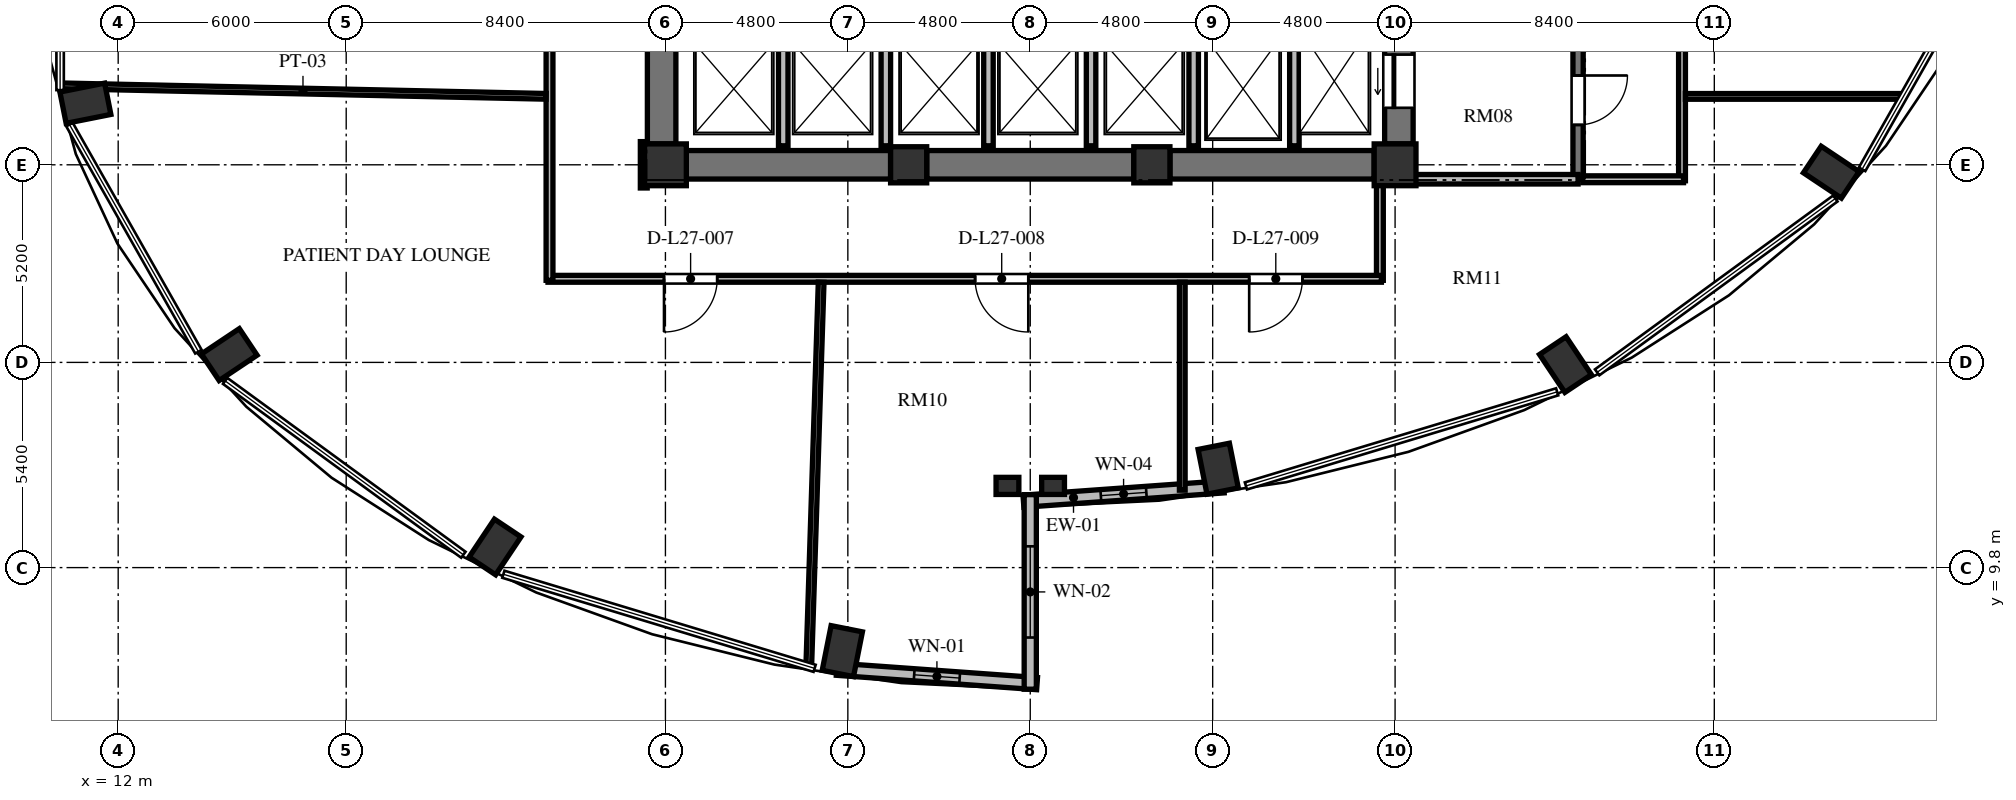
"""IFC4 building model, lengths in metres.
Left out: names, types, materials, properties, quantities, classifications, styles, units other than length and angle.
Written with IfcOpenShell. Run it as: python <this file> out.ifc"""

import sys

from ifc_helpers import new_model, si_unit, direction, frame, frame_2d, origin, origin_2d, place, context, subcontext, project, spatial, rectangle, extrude, element, fill, save


model = new_model("IFC4")
c1 = context("Model", 3, precision=1e-05, world=origin(), true_north=direction((0.0, 1.0)))
c2 = subcontext(c1, "Body", "Model", "MODEL_VIEW")
j1 = project(units=[si_unit("LENGTHUNIT", "METRE"), si_unit("PLANEANGLEUNIT", "RADIAN")], contexts=[c1])
p1 = place(None, origin())
s1 = spatial("IfcSite", under=j1, at=p1, CompositionType="ELEMENT")
p2 = place(p1, origin())
s2 = spatial("IfcBuilding", under=s1, at=p2, CompositionType="ELEMENT")
p3 = place(p2, frame((0.0, 0.0, 107.28)))
s3 = spatial("IfcBuildingStorey", under=s2, at=p3, CompositionType="ELEMENT", Elevation=107.28)
for number, where, z_axis, x_axis in (
    (1, (40.946, 12.403, 0.0), (0.0, 0.0, 1.0), (0.195, -0.981, 0.0)),
    (2, (50.084, 15.143, 0.0), (0.0, 0.0, 1.0), (0.556, -0.831, 0.0)),
    (3, (57.078, 20.205, 0.0), (0.0, 0.0, 1.0), (0.831, -0.556, 0.0)),
    (4, (11.137, 22.02, 0.0), (0.0, 0.0, 1.0), (-0.981, -0.195, 0.0)),
    (5, (14.922, 15.405, 0.0), (0.0, 0.0, 1.0), (-0.831, -0.556, 0.0)),
    (6, (21.916, 10.343, 0.0), (0.0, 0.0, 1.0), (-0.556, -0.831, 0.0)),
    (7, (31.054, 7.603, 0.0), (0.0, 0.0, 1.0), (-0.195, -0.981, 0.0)),
):
    element("IfcColumn", number, at=place(p3, frame(where, z_axis=z_axis, x_axis=x_axis)), inside=s3, PredefinedType="COLUMN", context=c2, shape_type="SweptSolid", body=[
        extrude(rectangle(XDim=1.2, YDim=0.84, at=origin_2d()), origin(), (0.0, 0.0, 1.0), 3.648),
    ])
p4 = place(p3, frame((26.4, 20.4, 0.0), z_axis=(0.0, 0.0, 1.0), x_axis=(1.0, 0.0, 0.0)))
e8 = element("IfcColumn", 8, at=p4, inside=s3, PredefinedType="COLUMN", context=c2, shape_type="SweptSolid", body=[
    extrude(rectangle(XDim=1.1, YDim=1.1, at=origin_2d()), origin(), (0.0, 0.0, 1.0), 3.648),
])
for number, where, z_axis, x_axis in (
    (9, (32.8, 20.4, 0.0), (0.0, 0.0, 1.0), (1.0, 0.0, 0.0)),
    (10, (39.2, 20.4, 0.0), (0.0, 0.0, 1.0), (1.0, 0.0, 0.0)),
):
    element("IfcColumn", number, at=place(p3, frame(where, z_axis=z_axis, x_axis=x_axis)), inside=s3, PredefinedType="COLUMN", context=c2, shape_type="SweptSolid", body=[
        extrude(rectangle(XDim=0.95, YDim=0.95, at=origin_2d()), origin(), (0.0, 0.0, 1.0), 3.648),
    ])
p5 = place(p3, frame((45.6, 20.4, 0.0), z_axis=(0.0, 0.0, 1.0), x_axis=(1.0, 0.0, 0.0)))
e11 = element("IfcColumn", 11, at=p5, inside=s3, PredefinedType="COLUMN", context=c2, shape_type="SweptSolid", body=[
    extrude(rectangle(XDim=1.1, YDim=1.1, at=origin_2d()), origin(), (0.0, 0.0, 1.0), 3.648),
])
for number, where, z_axis, x_axis in (
    (12, (35.4, 11.95, 0.0), (0.0, 0.0, 1.0), (1.0, 0.0, 0.0)),
    (13, (36.6, 11.95, 0.0), (0.0, 0.0, 1.0), (1.0, 0.0, 0.0)),
):
    element("IfcColumn", number, at=place(p3, frame(where, z_axis=z_axis, x_axis=x_axis)), inside=s3, PredefinedType="PILASTER", context=c2, shape_type="SweptSolid", body=[
        extrude(rectangle(XDim=0.6, YDim=0.45, at=origin_2d()), origin(), (0.0, 0.0, 1.0), 3.648),
    ])
p6 = place(p3, frame((26.3, 20.95, 0.0), z_axis=(0.0, 0.0, 1.0), x_axis=(0.0, 1.0, 0.0)))
e14 = element("IfcWall", 14, at=p6, inside=s3, PredefinedType="SHEAR", context=c2, shape_type="SweptSolid", body=[
    extrude(rectangle(XDim=14.1, YDim=0.75, at=frame_2d((7.05, 0.0))), origin(), (0.0, 0.0, 1.0), 3.648),
])
p7 = place(p6, frame((6.5, 0.0, 0.0)))
e15 = element("IfcOpeningElement", 15, at=p7, cuts=e14, PredefinedType="OPENING", context=c2, shape_type="SweptSolid", body=[
    extrude(rectangle(XDim=1.2, YDim=2.15, at=frame_2d((0.6, 1.075))), frame((0.0, 0.385, 0.0), z_axis=(0.0, -1.0, 0.0), x_axis=(1.0, 0.0, 0.0)), (0.0, 0.0, 1.0), 0.77),
])
p8 = place(p6, frame((9.6, 0.0, 0.0)))
e16 = element("IfcOpeningElement", 16, at=p8, cuts=e14, PredefinedType="OPENING", context=c2, shape_type="SweptSolid", body=[
    extrude(rectangle(XDim=1.3, YDim=2.2, at=frame_2d((0.65, 1.1))), frame((0.0, 0.385, 0.0), z_axis=(0.0, -1.0, 0.0), x_axis=(1.0, 0.0, 0.0)), (0.0, 0.0, 1.0), 0.77),
])
p9 = place(p6, frame((3.26, 0.0, 0.0)))
e17 = element("IfcOpeningElement", 17, at=p9, cuts=e14, PredefinedType="OPENING", context=c2, shape_type="SweptSolid", body=[
    extrude(rectangle(XDim=1.3, YDim=2.2, at=frame_2d((0.65, 1.1))), frame((0.0, 0.385, 0.0), z_axis=(0.0, -1.0, 0.0), x_axis=(1.0, 0.0, 0.0)), (0.0, 0.0, 1.0), 0.77),
])
p10 = place(p3, frame((45.7, 20.95, 0.0), z_axis=(0.0, 0.0, 1.0), x_axis=(0.0, 1.0, 0.0)))
e18 = element("IfcWall", 18, at=p10, inside=s3, PredefinedType="SHEAR", context=c2, shape_type="SweptSolid", body=[
    extrude(rectangle(XDim=14.1, YDim=0.75, at=frame_2d((7.05, 0.0))), origin(), (0.0, 0.0, 1.0), 3.648),
])
p11 = place(p10, frame((11.75, 0.0, 0.0)))
e19 = element("IfcOpeningElement", 19, at=p11, cuts=e18, PredefinedType="OPENING", context=c2, shape_type="SweptSolid", body=[
    extrude(rectangle(XDim=1.4, YDim=2.3, at=frame_2d((0.7, 1.15))), frame((0.0, 0.385, 0.0), z_axis=(0.0, -1.0, 0.0), x_axis=(1.0, 0.0, 0.0)), (0.0, 0.0, 1.0), 0.77),
])
p12 = place(p10, frame((0.95, 0.0, 0.0)))
e20 = element("IfcOpeningElement", 20, at=p12, cuts=e18, PredefinedType="OPENING", context=c2, shape_type="SweptSolid", body=[
    extrude(rectangle(XDim=1.4, YDim=2.3, at=frame_2d((0.7, 1.15))), frame((0.0, 0.385, 0.0), z_axis=(0.0, -1.0, 0.0), x_axis=(1.0, 0.0, 0.0)), (0.0, 0.0, 1.0), 0.77),
])
p13 = place(p3, frame((26.95, 20.4, 0.0), z_axis=(0.0, 0.0, 1.0), x_axis=(1.0, 0.0, 0.0)))
e21 = element("IfcWall", 21, at=p13, inside=s3, PredefinedType="SHEAR", context=c2, shape_type="SweptSolid", body=[
    extrude(rectangle(XDim=5.375, YDim=0.75, at=frame_2d((2.688, 0.0))), origin(), (0.0, 0.0, 1.0), 3.648),
])
p14 = place(p3, frame((33.275, 20.4, 0.0), z_axis=(0.0, 0.0, 1.0), x_axis=(1.0, 0.0, 0.0)))
e22 = element("IfcWall", 22, at=p14, inside=s3, PredefinedType="SHEAR", context=c2, shape_type="SweptSolid", body=[
    extrude(rectangle(XDim=5.45, YDim=0.75, at=frame_2d((2.725, 0.0))), origin(), (0.0, 0.0, 1.0), 3.648),
])
p15 = place(p3, frame((39.675, 20.4, 0.0), z_axis=(0.0, 0.0, 1.0), x_axis=(1.0, 0.0, 0.0)))
e23 = element("IfcWall", 23, at=p15, inside=s3, PredefinedType="SHEAR", context=c2, shape_type="SweptSolid", body=[
    extrude(rectangle(XDim=5.375, YDim=0.75, at=frame_2d((2.688, 0.0))), origin(), (0.0, 0.0, 1.0), 3.648),
])
p16 = place(p3, frame((35.821, 11.547, 0.0), z_axis=(0.0, 0.0, 1.0), x_axis=(0.997432364291, 0.071614793619, 0.0)))
e24 = element("IfcWall", 24, at=p16, inside=s3, PredefinedType="SOLIDWALL", context=c2, shape_type="SweptSolid", body=[
    extrude(rectangle(XDim=5.284, YDim=0.32, at=frame_2d((2.642, 0.0))), origin(), (0.0, 0.0, 1.0), 3.428),
])
p17 = place(p16, frame((2.042, 0.0, 0.85)))
e25 = element("IfcOpeningElement", 25, at=p17, cuts=e24, PredefinedType="OPENING", context=c2, shape_type="SweptSolid", body=[
    extrude(rectangle(XDim=1.2, YDim=1.8, at=frame_2d((0.6, 0.9))), frame((0.0, 0.17, 0.0), z_axis=(0.0, -1.0, 0.0), x_axis=(1.0, 0.0, 0.0)), (0.0, 0.0, 1.0), 0.34),
])
p18 = place(p3, frame((30.909, 7.125, 0.0), z_axis=(0.0, 0.0, 1.0), x_axis=(0.997431890304, -0.071621394884, 0.0)))
e26 = element("IfcWall", 26, at=p18, inside=s3, PredefinedType="SOLIDWALL", context=c2, shape_type="SweptSolid", body=[
    extrude(rectangle(XDim=5.284, YDim=0.32, at=frame_2d((2.642, 0.0))), origin(), (0.0, 0.0, 1.0), 3.428),
])
p19 = place(p18, frame((2.042, 0.0, 0.85)))
e27 = element("IfcOpeningElement", 27, at=p19, cuts=e26, PredefinedType="OPENING", context=c2, shape_type="SweptSolid", body=[
    extrude(rectangle(XDim=1.2, YDim=2.2, at=frame_2d((0.6, 1.1))), frame((0.0, 0.17, 0.0), z_axis=(0.0, -1.0, 0.0), x_axis=(1.0, 0.0, 0.0)), (0.0, 0.0, 1.0), 0.34),
])
p20 = place(p3, frame((36.0, 6.6, 0.0), z_axis=(0.0, 0.0, 1.0), x_axis=(0.0, 1.0, 0.0)))
e28 = element("IfcWall", 28, at=p20, inside=s3, PredefinedType="SOLIDWALL", context=c2, shape_type="SweptSolid", body=[
    extrude(rectangle(XDim=5.12, YDim=0.32, at=frame_2d((2.56, 0.0))), origin(), (0.0, 0.0, 1.0), 3.428),
])
p21 = place(p20, frame((1.36, 0.0, 0.84)))
e29 = element("IfcOpeningElement", 29, at=p21, cuts=e28, PredefinedType="OPENING", context=c2, shape_type="SweptSolid", body=[
    extrude(rectangle(XDim=2.4, YDim=2.04, at=frame_2d((1.2, 1.02))), frame((0.0, 0.17, 0.0), z_axis=(0.0, -1.0, 0.0), x_axis=(1.0, 0.0, 0.0)), (0.0, 0.0, 1.0), 0.34),
])
p22 = place(p3, frame((42.95, 20.9, 0.0), z_axis=(0.0, 0.0, 1.0), x_axis=(0.0, 1.0, 0.0)))
e30 = element("IfcWall", 30, at=p22, inside=s3, PredefinedType="SOLIDWALL", context=c2, shape_type="SweptSolid", body=[
    extrude(rectangle(XDim=3.2, YDim=0.25, at=frame_2d((1.6, 0.0))), origin(), (0.0, 0.0, 1.0), 3.428),
])
for number, where, z_axis, x_axis in (
    (31, (29.5, 20.9, 0.0), (0.0, 0.0, 1.0), (0.0, 1.0, 0.0)),
    (32, (32.2, 20.9, 0.0), (0.0, 0.0, 1.0), (0.0, 1.0, 0.0)),
    (33, (34.9, 20.9, 0.0), (0.0, 0.0, 1.0), (0.0, 1.0, 0.0)),
    (34, (37.6, 20.9, 0.0), (0.0, 0.0, 1.0), (0.0, 1.0, 0.0)),
    (35, (40.3, 20.9, 0.0), (0.0, 0.0, 1.0), (0.0, 1.0, 0.0)),
):
    element("IfcWall", number, at=place(p3, frame(where, z_axis=z_axis, x_axis=x_axis)), inside=s3, PredefinedType="SOLIDWALL", context=c2, shape_type="SweptSolid", body=[
        extrude(rectangle(XDim=2.8, YDim=0.25, at=frame_2d((1.4, 0.0))), origin(), (0.0, 0.0, 1.0), 3.428),
    ])
p23 = place(p3, frame((50.415, 35.845, 0.0), z_axis=(0.0, 0.0, 1.0), x_axis=(0.0, -1.0, 0.0)))
e36 = element("IfcWall", 36, at=p23, inside=s3, PredefinedType="SHEAR", context=c2, shape_type="SweptSolid", body=[
    extrude(rectangle(XDim=15.825, YDim=0.27, at=frame_2d((7.913, 0.0))), origin(), (0.0, 0.0, 1.0), 3.648),
])
p24 = place(p23, frame((4.445, 0.0, 0.0)))
e37 = element("IfcOpeningElement", 37, at=p24, cuts=e36, PredefinedType="OPENING", context=c2, shape_type="SweptSolid", body=[
    extrude(rectangle(XDim=1.2, YDim=2.15, at=frame_2d((0.6, 1.075))), frame((0.0, 0.145, 0.0), z_axis=(0.0, -1.0, 0.0), x_axis=(1.0, 0.0, 0.0)), (0.0, 0.0, 1.0), 0.29),
])
p25 = place(p23, frame((1.295, 0.0, 0.0)))
e38 = element("IfcOpeningElement", 38, at=p25, cuts=e36, PredefinedType="OPENING", context=c2, shape_type="SweptSolid", body=[
    extrude(rectangle(XDim=1.3, YDim=2.2, at=frame_2d((0.65, 1.1))), frame((0.0, 0.145, 0.0), z_axis=(0.0, -1.0, 0.0), x_axis=(1.0, 0.0, 0.0)), (0.0, 0.0, 1.0), 0.29),
])
p26 = place(p23, frame((13.095, 0.0, 0.0)))
e39 = element("IfcOpeningElement", 39, at=p26, cuts=e36, PredefinedType="OPENING", context=c2, shape_type="SweptSolid", body=[
    extrude(rectangle(XDim=1.3, YDim=2.2, at=frame_2d((0.65, 1.1))), frame((0.0, 0.145, 0.0), z_axis=(0.0, -1.0, 0.0), x_axis=(1.0, 0.0, 0.0)), (0.0, 0.0, 1.0), 0.29),
])
p27 = place(p3, frame((45.7, 20.02, 0.0), z_axis=(0.0, 0.0, 1.0), x_axis=(1.0, 0.0, 0.0)))
e40 = element("IfcWall", 40, at=p27, inside=s3, PredefinedType="SOLIDWALL", context=c2, shape_type="SweptSolid", body=[
    extrude(rectangle(XDim=4.715, YDim=0.25, at=frame_2d((2.357, 0.0))), origin(), (0.0, 0.0, 1.0), 3.428),
])
p28 = place(p3, frame((53.15, 26.64, 0.0), z_axis=(0.0, 0.0, 1.0), x_axis=(0.0, -1.0, 0.0)))
e41 = element("IfcWall", 41, at=p28, inside=s3, PredefinedType="PARTITIONING", context=c2, shape_type="SweptSolid", body=[
    extrude(rectangle(XDim=6.66, YDim=0.18, at=frame_2d((3.33, 0.0))), origin(), (0.0, 0.0, 1.0), 3.428),
])
p29 = place(p3, frame((53.19, 20.02, 0.0), z_axis=(0.0, 0.0, 1.0), x_axis=(-1.0, 0.0, 0.0)))
e42 = element("IfcWall", 42, at=p29, inside=s3, PredefinedType="PARTITIONING", context=c2, shape_type="SweptSolid", body=[
    extrude(rectangle(XDim=2.65, YDim=0.18, at=frame_2d((1.325, 0.0))), origin(), (0.0, 0.0, 1.0), 3.428),
])
p30 = place(p3, frame((25.83, 21.01, 0.0), z_axis=(0.0, 0.0, 1.0), x_axis=(0.0, -1.0, 0.0)))
e43 = element("IfcWall", 43, at=p30, inside=s3, PredefinedType="PARTITIONING", context=c2, shape_type="SweptSolid", body=[
    extrude(rectangle(XDim=1.22, YDim=0.18, at=frame_2d((0.61, 0.0))), origin(), (0.0, 0.0, 1.0), 3.428),
])
p31 = place(p3, frame((45.2, 19.91, 0.0), z_axis=(0.0, 0.0, 1.0), x_axis=(0.0, -1.0, 0.0)))
e44 = element("IfcWall", 44, at=p31, inside=s3, PredefinedType="PARTITIONING", context=c2, shape_type="SweptSolid", body=[
    extrude(rectangle(XDim=2.55, YDim=0.18, at=frame_2d((1.275, 0.0))), origin(), (0.0, 0.0, 1.0), 3.428),
])
p32 = place(p3, frame((45.24, 17.4, 0.0), z_axis=(0.0, 0.0, 1.0), x_axis=(-1.0, 0.0, 0.0)))
e45 = element("IfcWall", 45, at=p32, inside=s3, PredefinedType="PARTITIONING", context=c2, shape_type="SweptSolid", body=[
    extrude(rectangle(XDim=21.93, YDim=0.18, at=frame_2d((10.965, 0.0))), origin(), (0.0, 0.0, 1.0), 3.053),
])
p33 = place(p32, frame((17.477, 0.0, 0.0)))
e46 = element("IfcOpeningElement", 46, at=p33, cuts=e45, PredefinedType="OPENING", context=c2, shape_type="SweptSolid", body=[
    extrude(rectangle(XDim=1.4, YDim=2.2, at=frame_2d((0.7, 1.1))), frame((0.0, 0.1, 0.0), z_axis=(0.0, -1.0, 0.0), x_axis=(1.0, 0.0, 0.0)), (0.0, 0.0, 1.0), 0.2),
])
p34 = place(p32, frame((9.291, 0.0, 0.0)))
e47 = element("IfcOpeningElement", 47, at=p34, cuts=e45, PredefinedType="OPENING", context=c2, shape_type="SweptSolid", body=[
    extrude(rectangle(XDim=1.4, YDim=2.2, at=frame_2d((0.7, 1.1))), frame((0.0, 0.1, 0.0), z_axis=(0.0, -1.0, 0.0), x_axis=(1.0, 0.0, 0.0)), (0.0, 0.0, 1.0), 0.2),
])
p35 = place(p32, frame((2.079, 0.0, 0.0)))
e48 = element("IfcOpeningElement", 48, at=p35, cuts=e45, PredefinedType="OPENING", context=c2, shape_type="SweptSolid", body=[
    extrude(rectangle(XDim=1.4, YDim=2.2, at=frame_2d((0.7, 1.1))), frame((0.0, 0.1, 0.0), z_axis=(0.0, -1.0, 0.0), x_axis=(1.0, 0.0, 0.0)), (0.0, 0.0, 1.0), 0.2),
])
p36 = place(p3, frame((23.35, 17.36, 0.0), z_axis=(0.0, 0.0, 1.0), x_axis=(0.0, 1.0, 0.0)))
e49 = element("IfcWall", 49, at=p36, inside=s3, PredefinedType="PARTITIONING", context=c2, shape_type="SweptSolid", body=[
    extrude(rectangle(XDim=9.28, YDim=0.18, at=frame_2d((4.64, 0.0))), origin(), (0.0, 0.0, 1.0), 3.428),
])
p37 = place(p3, frame((10.465, 22.479, 0.0), z_axis=(0.0, 0.0, 1.0), x_axis=(0.999765147572, -0.021671402821, 0.0)))
e50 = element("IfcWall", 50, at=p37, inside=s3, PredefinedType="PARTITIONING", context=c2, shape_type="SweptSolid", body=[
    extrude(rectangle(XDim=12.798, YDim=0.15, at=frame_2d((6.399, 0.0))), origin(), (0.0, 0.0, 1.0), 3.428),
])
p38 = place(p3, frame((53.24, 22.2, 0.0), z_axis=(0.0, 0.0, 1.0), x_axis=(1.0, 0.0, 0.0)))
e51 = element("IfcWall", 51, at=p38, inside=s3, PredefinedType="PARTITIONING", context=c2, shape_type="SweptSolid", body=[
    extrude(rectangle(XDim=5.731, YDim=0.15, at=frame_2d((2.866, 0.0))), origin(), (0.0, 0.0, 1.0), 3.428),
])
p39 = place(p3, frame((30.171, 7.195, 0.0), z_axis=(0.0, 0.0, 1.0), x_axis=(0.03222807912, 0.999480540539, 0.0)))
e52 = element("IfcWall", 52, at=p39, inside=s3, PredefinedType="PARTITIONING", context=c2, shape_type="SweptSolid", body=[
    extrude(rectangle(XDim=10.121, YDim=0.15, at=frame_2d((5.061, 0.0))), origin(), (0.0, 0.0, 1.0), 3.428),
])
p40 = place(p3, frame((40.0, 11.837, 0.0), z_axis=(0.0, 0.0, 1.0), x_axis=(0.0, 1.0, 0.0)))
e53 = element("IfcWall", 53, at=p40, inside=s3, PredefinedType="PARTITIONING", context=c2, shape_type="SweptSolid", body=[
    extrude(rectangle(XDim=5.473, YDim=0.15, at=frame_2d((2.736, 0.0))), origin(), (0.0, 0.0, 1.0), 2.813),
])
p41 = place(p17, origin())
e54 = element("IfcWindow", 54, at=p41, inside=s3, PartitioningType="SINGLE_PANEL", PredefinedType="WINDOW", context=c2, shape_type="SweptSolid", body=[
    extrude(rectangle(XDim=1.2, YDim=1.8, at=frame_2d((0.6, 0.9))), frame((0.0, 0.03, 0.0), z_axis=(0.0, -1.0, 0.0), x_axis=(1.0, 0.0, 0.0)), (0.0, 0.0, 1.0), 0.06),
])
fill(e25, e54)
p42 = place(p19, origin())
e55 = element("IfcWindow", 55, at=p42, inside=s3, PartitioningType="SINGLE_PANEL", PredefinedType="WINDOW", context=c2, shape_type="SweptSolid", body=[
    extrude(rectangle(XDim=1.2, YDim=2.2, at=frame_2d((0.6, 1.1))), frame((0.0, 0.03, 0.0), z_axis=(0.0, -1.0, 0.0), x_axis=(1.0, 0.0, 0.0)), (0.0, 0.0, 1.0), 0.06),
])
fill(e27, e55)
p43 = place(p21, origin())
e56 = element("IfcWindow", 56, at=p43, inside=s3, PartitioningType="SINGLE_PANEL", PredefinedType="WINDOW", context=c2, shape_type="SweptSolid", body=[
    extrude(rectangle(XDim=2.4, YDim=2.04, at=frame_2d((1.2, 1.02))), frame((0.0, 0.03, 0.0), z_axis=(0.0, -1.0, 0.0), x_axis=(1.0, 0.0, 0.0)), (0.0, 0.0, 1.0), 0.06),
])
fill(e29, e56)
p44 = place(p12, origin())
e57 = element("IfcDoor", 57, at=p44, inside=s3, OperationType="SLIDING_TO_LEFT", PredefinedType="DOOR", context=c2, shape_type="SweptSolid", body=[
    extrude(rectangle(XDim=1.4, YDim=2.3, at=frame_2d((0.7, 1.15))), frame((0.0, 0.025, 0.0), z_axis=(0.0, -1.0, 0.0), x_axis=(1.0, 0.0, 0.0)), (0.0, 0.0, 1.0), 0.05),
])
fill(e20, e57)
p45 = place(p26, origin())
e58 = element("IfcDoor", 58, at=p45, inside=s3, OperationType="SINGLE_SWING_LEFT", PredefinedType="DOOR", context=c2, shape_type="SweptSolid", body=[
    extrude(rectangle(XDim=1.3, YDim=2.2, at=frame_2d((0.65, 1.1))), frame((0.0, 0.025, 0.0), z_axis=(0.0, -1.0, 0.0), x_axis=(1.0, 0.0, 0.0)), (0.0, 0.0, 1.0), 0.05),
])
fill(e39, e58)
p46 = place(p33, origin())
e59 = element("IfcDoor", 59, at=p46, inside=s3, OperationType="SINGLE_SWING_RIGHT", PredefinedType="DOOR", context=c2, shape_type="SweptSolid", body=[
    extrude(rectangle(XDim=1.4, YDim=2.2, at=frame_2d((0.7, 1.1))), frame((0.0, 0.025, 0.0), z_axis=(0.0, -1.0, 0.0), x_axis=(1.0, 0.0, 0.0)), (0.0, 0.0, 1.0), 0.05),
])
fill(e46, e59)
p47 = place(p34, origin())
e60 = element("IfcDoor", 60, at=p47, inside=s3, OperationType="SINGLE_SWING_LEFT", PredefinedType="DOOR", context=c2, shape_type="SweptSolid", body=[
    extrude(rectangle(XDim=1.4, YDim=2.2, at=frame_2d((0.7, 1.1))), frame((0.0, 0.025, 0.0), z_axis=(0.0, -1.0, 0.0), x_axis=(1.0, 0.0, 0.0)), (0.0, 0.0, 1.0), 0.05),
])
fill(e47, e60)
p48 = place(p35, origin())
e61 = element("IfcDoor", 61, at=p48, inside=s3, OperationType="SINGLE_SWING_RIGHT", PredefinedType="DOOR", context=c2, shape_type="SweptSolid", body=[
    extrude(rectangle(XDim=1.4, YDim=2.2, at=frame_2d((0.7, 1.1))), frame((0.0, 0.025, 0.0), z_axis=(0.0, -1.0, 0.0), x_axis=(1.0, 0.0, 0.0)), (0.0, 0.0, 1.0), 0.05),
])
fill(e48, e61)
save(model, sys.argv[1])
